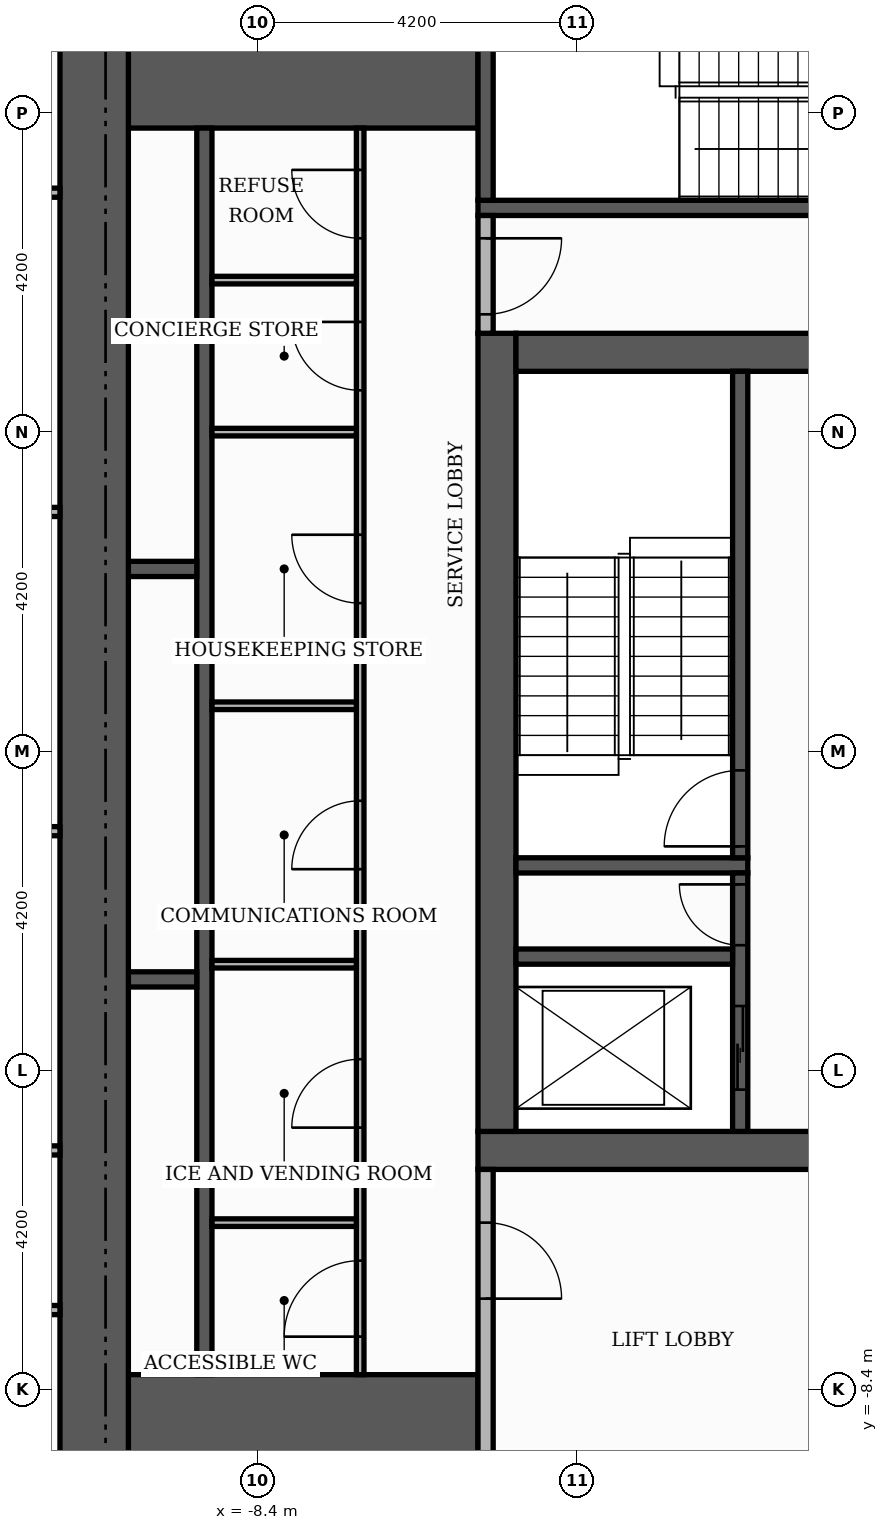
"""IFC4 building model, lengths in metres.
Left out: names, types, materials, properties, quantities, classifications, styles, units other than length and angle.
Written with IfcOpenShell. Run it as: python <this file> out.ifc"""

import sys

from ifc_helpers import new_model, si_unit, direction, frame, frame_2d, origin, place, context, subcontext, project, spatial, rectangle, extrude, element, fill, save


model = new_model("IFC4")
c1 = context("Model", 3, precision=1e-05, world=origin(), true_north=direction((0.0, 1.0)))
c2 = subcontext(c1, "Body", "Model", "MODEL_VIEW")
j1 = project(units=[si_unit("LENGTHUNIT", "METRE"), si_unit("PLANEANGLEUNIT", "RADIAN")], contexts=[c1])
p1 = place(None, origin())
s1 = spatial("IfcSite", under=j1, at=p1, CompositionType="ELEMENT")
p2 = place(p1, origin())
s2 = spatial("IfcBuilding", under=s1, at=p2, CompositionType="ELEMENT")
p3 = place(p2, frame((0.0, 0.0, 145.5)))
s3 = spatial("IfcBuildingStorey", under=s2, at=p3, CompositionType="ELEMENT", Elevation=145.5)
p4 = place(p3, frame((-5.5, -5.25, 0.0), z_axis=(0.0, 0.0, 1.0), x_axis=(1.0, 0.0, 0.0)))
e1 = element("IfcWall", 1, at=p4, inside=s3, PredefinedType="SHEAR", context=c2, shape_type="SweptSolid", body=[
    extrude(rectangle(XDim=11.0, YDim=0.5, at=frame_2d((5.5, 0.0))), origin(), (0.0, 0.0, 1.0), 3.48),
])
p5 = place(p4, frame((4.9, 0.0, 0.0)))
e2 = element("IfcOpeningElement", 2, at=p5, cuts=e1, PredefinedType="OPENING", context=c2, shape_type="SweptSolid", body=[
    extrude(rectangle(XDim=1.2, YDim=2.1, at=frame_2d((0.6, 1.05))), frame((0.0, 0.26, 0.0), z_axis=(0.0, -1.0, 0.0), x_axis=(1.0, 0.0, 0.0)), (0.0, 0.0, 1.0), 0.52),
])
p6 = place(p3, frame((-5.25, -5.0, 0.0), z_axis=(0.0, 0.0, 1.0), x_axis=(0.0, 1.0, 0.0)))
e3 = element("IfcWall", 3, at=p6, inside=s3, PredefinedType="SHEAR", context=c2, shape_type="SweptSolid", body=[
    extrude(rectangle(XDim=10.5, YDim=0.5, at=frame_2d((5.25, 0.0))), origin(), (0.0, 0.0, 1.0), 3.48),
])
p7 = place(p3, frame((-5.0, 5.25, 0.0), z_axis=(0.0, 0.0, 1.0), x_axis=(1.0, 0.0, 0.0)))
e4 = element("IfcWall", 4, at=p7, inside=s3, PredefinedType="SHEAR", context=c2, shape_type="SweptSolid", body=[
    extrude(rectangle(XDim=10.0, YDim=0.5, at=frame_2d((5.0, 0.0))), origin(), (0.0, 0.0, 1.0), 3.48),
])
p8 = place(p7, frame((4.4, 0.0, 0.0)))
e5 = element("IfcOpeningElement", 5, at=p8, cuts=e4, PredefinedType="OPENING", context=c2, shape_type="SweptSolid", body=[
    extrude(rectangle(XDim=1.2, YDim=2.1, at=frame_2d((0.6, 1.05))), frame((0.0, 0.26, 0.0), z_axis=(0.0, -1.0, 0.0), x_axis=(1.0, 0.0, 0.0)), (0.0, 0.0, 1.0), 0.52),
])
for number, where, z_axis, x_axis in (
    (6, (-10.1, -9.15, 0.0), (0.0, 0.0, 1.0), (1.0, 0.0, 0.0)),
    (7, (-10.1, 9.15, 0.0), (0.0, 0.0, 1.0), (1.0, 0.0, 0.0)),
):
    element("IfcWall", number, at=place(p3, frame(where, z_axis=z_axis, x_axis=x_axis)), inside=s3, PredefinedType="SHEAR", context=c2, shape_type="SweptSolid", body=[
        extrude(rectangle(XDim=4.6, YDim=1.9, at=frame_2d((2.3, 0.0))), origin(), (0.0, 0.0, 1.0), 3.48),
    ])
p9 = place(p3, frame((-5.0, -1.5, 0.0), z_axis=(0.0, 0.0, 1.0), x_axis=(1.0, 0.0, 0.0)))
e8 = element("IfcWall", 8, at=p9, inside=s3, PredefinedType="SHEAR", context=c2, shape_type="SweptSolid", body=[
    extrude(rectangle(XDim=3.05, YDim=0.2, at=frame_2d((1.525, 0.0))), origin(), (0.0, 0.0, 1.0), 3.48),
])
p10 = place(p3, frame((-2.05, -1.4, 0.0), z_axis=(0.0, 0.0, 1.0), x_axis=(0.0, 1.0, 0.0)))
e9 = element("IfcWall", 9, at=p10, inside=s3, PredefinedType="SHEAR", context=c2, shape_type="SweptSolid", body=[
    extrude(rectangle(XDim=6.4, YDim=0.2, at=frame_2d((3.2, 0.0))), origin(), (0.0, 0.0, 1.0), 3.48),
])
p11 = place(p10, frame((0.15, 0.0, 0.0)))
e10 = element("IfcOpeningElement", 10, at=p11, cuts=e9, PredefinedType="OPENING", context=c2, shape_type="SweptSolid", body=[
    extrude(rectangle(XDim=1.0, YDim=2.1, at=frame_2d((0.5, 1.05))), frame((0.0, 0.11, 0.0), z_axis=(0.0, -1.0, 0.0), x_axis=(1.0, 0.0, 0.0)), (0.0, 0.0, 1.0), 0.22),
])
p12 = place(p3, frame((-5.5, 7.15, 0.0), z_axis=(0.0, 0.0, 1.0), x_axis=(1.0, 0.0, 0.0)))
e11 = element("IfcWall", 11, at=p12, inside=s3, PredefinedType="SHEAR", context=c2, shape_type="SweptSolid", body=[
    extrude(rectangle(XDim=6.8, YDim=0.2, at=frame_2d((3.4, 0.0))), origin(), (0.0, 0.0, 1.0), 3.48),
])
p13 = place(p3, frame((-5.4, 7.25, 0.0), z_axis=(0.0, 0.0, 1.0), x_axis=(0.0, 1.0, 0.0)))
e12 = element("IfcWall", 12, at=p13, inside=s3, PredefinedType="SHEAR", context=c2, shape_type="SweptSolid", body=[
    extrude(rectangle(XDim=2.85, YDim=0.2, at=frame_2d((1.425, 0.0))), origin(), (0.0, 0.0, 1.0), 3.48),
])
p14 = place(p3, frame((-9.1, -8.2, 0.0), z_axis=(0.0, 0.0, 1.0), x_axis=(0.0, 1.0, 0.0)))
e13 = element("IfcWall", 13, at=p14, inside=s3, PredefinedType="SHEAR", context=c2, shape_type="SweptSolid", body=[
    extrude(rectangle(XDim=16.4, YDim=0.2, at=frame_2d((8.2, 0.0))), origin(), (0.0, 0.0, 1.0), 3.48),
])
p15 = place(p3, frame((-2.05, -5.0, 0.0), z_axis=(0.0, 0.0, 1.0), x_axis=(0.0, 1.0, 0.0)))
e14 = element("IfcWall", 14, at=p15, inside=s3, PredefinedType="SHEAR", context=c2, shape_type="SweptSolid", body=[
    extrude(rectangle(XDim=3.4, YDim=0.2, at=frame_2d((1.7, 0.0))), origin(), (0.0, 0.0, 1.0), 3.48),
])
p16 = place(p15, frame((0.55, 0.0, 0.0)))
e15 = element("IfcOpeningElement", 15, at=p16, cuts=e14, PredefinedType="OPENING", context=c2, shape_type="SweptSolid", body=[
    extrude(rectangle(XDim=1.1, YDim=2.1, at=frame_2d((0.55, 1.05))), frame((0.0, 0.11, 0.0), z_axis=(0.0, -1.0, 0.0), x_axis=(1.0, 0.0, 0.0)), (0.0, 0.0, 1.0), 0.22),
])
p17 = place(p15, frame((2.45, 0.0, 0.0)))
e16 = element("IfcOpeningElement", 16, at=p17, cuts=e14, PredefinedType="OPENING", context=c2, shape_type="SweptSolid", body=[
    extrude(rectangle(XDim=0.8, YDim=2.1, at=frame_2d((0.4, 1.05))), frame((0.0, 0.11, 0.0), z_axis=(0.0, -1.0, 0.0), x_axis=(1.0, 0.0, 0.0)), (0.0, 0.0, 1.0), 0.22),
])
p18 = place(p3, frame((-10.1, -3.0, 0.0), z_axis=(0.0, 0.0, 1.0), x_axis=(1.0, 0.0, 0.0)))
e17 = element("IfcWall", 17, at=p18, inside=s3, PredefinedType="SHEAR", context=c2, shape_type="SweptSolid", body=[
    extrude(rectangle(XDim=0.9, YDim=0.2, at=frame_2d((0.45, 0.0))), origin(), (0.0, 0.0, 1.0), 3.48),
])
p19 = place(p3, frame((-5.0, -2.7, 0.0), z_axis=(0.0, 0.0, 1.0), x_axis=(1.0, 0.0, 0.0)))
e18 = element("IfcWall", 18, at=p19, inside=s3, PredefinedType="SHEAR", context=c2, shape_type="SweptSolid", body=[
    extrude(rectangle(XDim=2.85, YDim=0.2, at=frame_2d((1.425, 0.0))), origin(), (0.0, 0.0, 1.0), 3.48),
])
p20 = place(p3, frame((-10.1, 2.4, 0.0), z_axis=(0.0, 0.0, 1.0), x_axis=(1.0, 0.0, 0.0)))
e19 = element("IfcWall", 19, at=p20, inside=s3, PredefinedType="SHEAR", context=c2, shape_type="SweptSolid", body=[
    extrude(rectangle(XDim=0.9, YDim=0.2, at=frame_2d((0.45, 0.0))), origin(), (0.0, 0.0, 1.0), 3.48),
])
p21 = place(p3, frame((-10.55, -10.1, 0.0), z_axis=(0.0, 0.0, 1.0), x_axis=(0.0, 1.0, 0.0)))
e20 = element("IfcWall", 20, at=p21, inside=s3, PredefinedType="SHEAR", context=c2, shape_type="SweptSolid", body=[
    extrude(rectangle(XDim=20.2, YDim=0.9, at=frame_2d((10.1, 0.0))), origin(), (0.0, 0.0, 1.0), 3.48),
])
p22 = place(p3, frame((-5.4, -10.1, 0.0), z_axis=(0.0, 0.0, 1.0), x_axis=(0.0, 1.0, 0.0)))
e21 = element("IfcWall", 21, at=p22, inside=s3, PredefinedType="PARTITIONING", context=c2, shape_type="SweptSolid", body=[
    extrude(rectangle(XDim=4.6, YDim=0.2, at=frame_2d((2.3, 0.0))), origin(), (0.0, 0.0, 1.0), 3.48),
])
p23 = place(p22, frame((2.9, 0.0, 0.0)))
e22 = element("IfcOpeningElement", 22, at=p23, cuts=e21, PredefinedType="OPENING", context=c2, shape_type="SweptSolid", body=[
    extrude(rectangle(XDim=1.0, YDim=2.1, at=frame_2d((0.5, 1.05))), frame((0.0, 0.11, 0.0), z_axis=(0.0, -1.0, 0.0), x_axis=(1.0, 0.0, 0.0)), (0.0, 0.0, 1.0), 0.22),
])
p24 = place(p3, frame((-7.05, -8.2, 0.0), z_axis=(0.0, 0.0, 1.0), x_axis=(0.0, 1.0, 0.0)))
e23 = element("IfcWall", 23, at=p24, inside=s3, PredefinedType="PARTITIONING", context=c2, shape_type="SweptSolid", body=[
    extrude(rectangle(XDim=16.4, YDim=0.1, at=frame_2d((8.2, 0.0))), origin(), (0.0, 0.0, 1.0), 3.48),
])
p25 = place(p24, frame((0.5, 0.0, 0.0)))
e24 = element("IfcOpeningElement", 24, at=p25, cuts=e23, PredefinedType="OPENING", context=c2, shape_type="SweptSolid", body=[
    extrude(rectangle(XDim=1.0, YDim=2.1, at=frame_2d((0.5, 1.05))), frame((0.0, 0.06, 0.0), z_axis=(0.0, -1.0, 0.0), x_axis=(1.0, 0.0, 0.0)), (0.0, 0.0, 1.0), 0.12),
])
p26 = place(p24, frame((3.25, 0.0, 0.0)))
e25 = element("IfcOpeningElement", 25, at=p26, cuts=e23, PredefinedType="OPENING", context=c2, shape_type="SweptSolid", body=[
    extrude(rectangle(XDim=0.9, YDim=2.1, at=frame_2d((0.45, 1.05))), frame((0.0, 0.06, 0.0), z_axis=(0.0, -1.0, 0.0), x_axis=(1.0, 0.0, 0.0)), (0.0, 0.0, 1.0), 0.12),
])
p27 = place(p24, frame((6.65, 0.0, 0.0)))
e26 = element("IfcOpeningElement", 26, at=p27, cuts=e23, PredefinedType="OPENING", context=c2, shape_type="SweptSolid", body=[
    extrude(rectangle(XDim=0.9, YDim=2.1, at=frame_2d((0.45, 1.05))), frame((0.0, 0.06, 0.0), z_axis=(0.0, -1.0, 0.0), x_axis=(1.0, 0.0, 0.0)), (0.0, 0.0, 1.0), 0.12),
])
p28 = place(p24, frame((10.15, 0.0, 0.0)))
e27 = element("IfcOpeningElement", 27, at=p28, cuts=e23, PredefinedType="OPENING", context=c2, shape_type="SweptSolid", body=[
    extrude(rectangle(XDim=0.9, YDim=2.1, at=frame_2d((0.45, 1.05))), frame((0.0, 0.06, 0.0), z_axis=(0.0, -1.0, 0.0), x_axis=(1.0, 0.0, 0.0)), (0.0, 0.0, 1.0), 0.12),
])
p29 = place(p24, frame((12.95, 0.0, 0.0)))
e28 = element("IfcOpeningElement", 28, at=p29, cuts=e23, PredefinedType="OPENING", context=c2, shape_type="SweptSolid", body=[
    extrude(rectangle(XDim=0.9, YDim=2.1, at=frame_2d((0.45, 1.05))), frame((0.0, 0.06, 0.0), z_axis=(0.0, -1.0, 0.0), x_axis=(1.0, 0.0, 0.0)), (0.0, 0.0, 1.0), 0.12),
])
p30 = place(p24, frame((14.95, 0.0, 0.0)))
e29 = element("IfcOpeningElement", 29, at=p30, cuts=e23, PredefinedType="OPENING", context=c2, shape_type="SweptSolid", body=[
    extrude(rectangle(XDim=0.9, YDim=2.1, at=frame_2d((0.45, 1.05))), frame((0.0, 0.06, 0.0), z_axis=(0.0, -1.0, 0.0), x_axis=(1.0, 0.0, 0.0)), (0.0, 0.0, 1.0), 0.12),
])
for number, where, z_axis, x_axis in (
    (30, (-9.0, -6.2, 0.0), (0.0, 0.0, 1.0), (1.0, 0.0, 0.0)),
    (31, (-9.0, -2.8, 0.0), (0.0, 0.0, 1.0), (1.0, 0.0, 0.0)),
    (32, (-9.0, 0.6, 0.0), (0.0, 0.0, 1.0), (1.0, 0.0, 0.0)),
    (33, (-9.0, 4.2, 0.0), (0.0, 0.0, 1.0), (1.0, 0.0, 0.0)),
):
    element("IfcWall", number, at=place(p3, frame(where, z_axis=z_axis, x_axis=x_axis)), inside=s3, PredefinedType="PARTITIONING", context=c2, shape_type="SweptSolid", body=[
        extrude(rectangle(XDim=1.9, YDim=0.1, at=frame_2d((0.95, 0.0))), origin(), (0.0, 0.0, 1.0), 3.48),
    ])
p31 = place(p3, frame((-5.4, 5.5, 0.0), z_axis=(0.0, 0.0, 1.0), x_axis=(0.0, 1.0, 0.0)))
e34 = element("IfcWall", 34, at=p31, inside=s3, PredefinedType="PARTITIONING", context=c2, shape_type="SweptSolid", body=[
    extrude(rectangle(XDim=1.55, YDim=0.2, at=frame_2d((0.775, 0.0))), origin(), (0.0, 0.0, 1.0), 3.48),
])
p32 = place(p31, frame((0.25, 0.0, 0.0)))
e35 = element("IfcOpeningElement", 35, at=p32, cuts=e34, PredefinedType="OPENING", context=c2, shape_type="SweptSolid", body=[
    extrude(rectangle(XDim=1.0, YDim=2.1, at=frame_2d((0.5, 1.05))), frame((0.0, 0.11, 0.0), z_axis=(0.0, -1.0, 0.0), x_axis=(1.0, 0.0, 0.0)), (0.0, 0.0, 1.0), 0.22),
])
p33 = place(p3, frame((-9.0, 6.2, 0.0), z_axis=(0.0, 0.0, 1.0), x_axis=(1.0, 0.0, 0.0)))
e36 = element("IfcWall", 36, at=p33, inside=s3, PredefinedType="PARTITIONING", context=c2, shape_type="SweptSolid", body=[
    extrude(rectangle(XDim=1.9, YDim=0.1, at=frame_2d((0.95, 0.0))), origin(), (0.0, 0.0, 1.0), 3.48),
])
for number, where, z_axis, x_axis in (
    (37, (-18.62, -7.35, 0.0), (0.0, 0.0, 1.0), (1.0, 0.0, 0.0)),
    (38, (-18.62, -5.25, 0.0), (0.0, 0.0, 1.0), (1.0, 0.0, 0.0)),
    (39, (-18.62, -1.05, 0.0), (0.0, 0.0, 1.0), (1.0, 0.0, 0.0)),
    (40, (-18.62, 3.15, 0.0), (0.0, 0.0, 1.0), (1.0, 0.0, 0.0)),
):
    element("IfcWall", number, at=place(p3, frame(where, z_axis=z_axis, x_axis=x_axis)), inside=s3, PredefinedType="PARTITIONING", context=c2, shape_type="SweptSolid", body=[
        extrude(rectangle(XDim=7.62, YDim=0.12, at=frame_2d((3.81, 0.0))), origin(), (0.0, 0.0, 1.0), 3.48),
    ])
p34 = place(p3, frame((-18.62, 7.35, 0.0), z_axis=(0.0, 0.0, 1.0), x_axis=(1.0, 0.0, 0.0)))
e41 = element("IfcWall", 41, at=p34, inside=s3, PredefinedType="PARTITIONING", context=c2, shape_type="SweptSolid", body=[
    extrude(rectangle(XDim=7.62, YDim=0.12, at=frame_2d((3.81, 0.0))), origin(), (0.0, 0.0, 1.0), 3.48),
])
p35 = place(p34, frame((3.36, 0.0, 0.0)))
e42 = element("IfcOpeningElement", 42, at=p35, cuts=e41, PredefinedType="OPENING", context=c2, shape_type="SweptSolid", body=[
    extrude(rectangle(XDim=0.9, YDim=2.1, at=frame_2d((0.45, 1.05))), frame((0.0, 0.07, 0.0), z_axis=(0.0, -1.0, 0.0), x_axis=(1.0, 0.0, 0.0)), (0.0, 0.0, 1.0), 0.14),
])
p36 = place(p16, origin())
e43 = element("IfcDoor", 43, at=p36, inside=s3, OperationType="SLIDING_TO_LEFT", PredefinedType="DOOR", context=c2, shape_type="SweptSolid", body=[
    extrude(rectangle(XDim=1.1, YDim=2.1, at=frame_2d((0.55, 1.05))), frame((0.0, 0.025, 0.0), z_axis=(0.0, -1.0, 0.0), x_axis=(1.0, 0.0, 0.0)), (0.0, 0.0, 1.0), 0.05),
])
fill(e15, e43)
p37 = place(p11, origin())
e44 = element("IfcDoor", 44, at=p37, inside=s3, OperationType="SINGLE_SWING_LEFT", PredefinedType="DOOR", context=c2, shape_type="SweptSolid", body=[
    extrude(rectangle(XDim=1.0, YDim=2.1, at=frame_2d((0.5, 1.05))), frame((0.0, 0.025, 0.0), z_axis=(0.0, -1.0, 0.0), x_axis=(1.0, 0.0, 0.0)), (0.0, 0.0, 1.0), 0.05),
])
fill(e10, e44)
p38 = place(p17, origin())
e45 = element("IfcDoor", 45, at=p38, inside=s3, OperationType="SINGLE_SWING_RIGHT", PredefinedType="DOOR", context=c2, shape_type="SweptSolid", body=[
    extrude(rectangle(XDim=0.8, YDim=2.1, at=frame_2d((0.4, 1.05))), frame((0.0, 0.025, 0.0), z_axis=(0.0, -1.0, 0.0), x_axis=(1.0, 0.0, 0.0)), (0.0, 0.0, 1.0), 0.05),
])
fill(e16, e45)
p39 = place(p32, frame((1.0, 0.0, 0.0), z_axis=(0.0, 0.0, 1.0), x_axis=(-1.0, 0.0, 0.0)))
e46 = element("IfcDoor", 46, at=p39, inside=s3, OperationType="SINGLE_SWING_RIGHT", PredefinedType="DOOR", context=c2, shape_type="SweptSolid", body=[
    extrude(rectangle(XDim=1.0, YDim=2.1, at=frame_2d((0.5, 1.05))), frame((0.0, 0.025, 0.0), z_axis=(0.0, -1.0, 0.0), x_axis=(1.0, 0.0, 0.0)), (0.0, 0.0, 1.0), 0.05),
])
fill(e35, e46)
p40 = place(p23, frame((1.0, 0.0, 0.0), z_axis=(0.0, 0.0, 1.0), x_axis=(-1.0, 0.0, 0.0)))
e47 = element("IfcDoor", 47, at=p40, inside=s3, OperationType="SINGLE_SWING_LEFT", PredefinedType="DOOR", context=c2, shape_type="SweptSolid", body=[
    extrude(rectangle(XDim=1.0, YDim=2.1, at=frame_2d((0.5, 1.05))), frame((0.0, 0.025, 0.0), z_axis=(0.0, -1.0, 0.0), x_axis=(1.0, 0.0, 0.0)), (0.0, 0.0, 1.0), 0.05),
])
fill(e22, e47)
p41 = place(p25, origin())
e48 = element("IfcDoor", 48, at=p41, inside=s3, OperationType="SINGLE_SWING_LEFT", PredefinedType="DOOR", context=c2, shape_type="SweptSolid", body=[
    extrude(rectangle(XDim=1.0, YDim=2.1, at=frame_2d((0.5, 1.05))), frame((0.0, 0.025, 0.0), z_axis=(0.0, -1.0, 0.0), x_axis=(1.0, 0.0, 0.0)), (0.0, 0.0, 1.0), 0.05),
])
fill(e24, e48)
p42 = place(p26, origin())
e49 = element("IfcDoor", 49, at=p42, inside=s3, OperationType="SINGLE_SWING_LEFT", PredefinedType="DOOR", context=c2, shape_type="SweptSolid", body=[
    extrude(rectangle(XDim=0.9, YDim=2.1, at=frame_2d((0.45, 1.05))), frame((0.0, 0.025, 0.0), z_axis=(0.0, -1.0, 0.0), x_axis=(1.0, 0.0, 0.0)), (0.0, 0.0, 1.0), 0.05),
])
fill(e25, e49)
p43 = place(p27, origin())
e50 = element("IfcDoor", 50, at=p43, inside=s3, OperationType="SINGLE_SWING_LEFT", PredefinedType="DOOR", context=c2, shape_type="SweptSolid", body=[
    extrude(rectangle(XDim=0.9, YDim=2.1, at=frame_2d((0.45, 1.05))), frame((0.0, 0.025, 0.0), z_axis=(0.0, -1.0, 0.0), x_axis=(1.0, 0.0, 0.0)), (0.0, 0.0, 1.0), 0.05),
])
fill(e26, e50)
p44 = place(p28, origin())
e51 = element("IfcDoor", 51, at=p44, inside=s3, OperationType="SINGLE_SWING_RIGHT", PredefinedType="DOOR", context=c2, shape_type="SweptSolid", body=[
    extrude(rectangle(XDim=0.9, YDim=2.1, at=frame_2d((0.45, 1.05))), frame((0.0, 0.025, 0.0), z_axis=(0.0, -1.0, 0.0), x_axis=(1.0, 0.0, 0.0)), (0.0, 0.0, 1.0), 0.05),
])
fill(e27, e51)
p45 = place(p29, origin())
e52 = element("IfcDoor", 52, at=p45, inside=s3, OperationType="SINGLE_SWING_RIGHT", PredefinedType="DOOR", context=c2, shape_type="SweptSolid", body=[
    extrude(rectangle(XDim=0.9, YDim=2.1, at=frame_2d((0.45, 1.05))), frame((0.0, 0.025, 0.0), z_axis=(0.0, -1.0, 0.0), x_axis=(1.0, 0.0, 0.0)), (0.0, 0.0, 1.0), 0.05),
])
fill(e28, e52)
p46 = place(p30, origin())
e53 = element("IfcDoor", 53, at=p46, inside=s3, OperationType="SINGLE_SWING_RIGHT", PredefinedType="DOOR", context=c2, shape_type="SweptSolid", body=[
    extrude(rectangle(XDim=0.9, YDim=2.1, at=frame_2d((0.45, 1.05))), frame((0.0, 0.025, 0.0), z_axis=(0.0, -1.0, 0.0), x_axis=(1.0, 0.0, 0.0)), (0.0, 0.0, 1.0), 0.05),
])
fill(e29, e53)
save(model, sys.argv[1])
